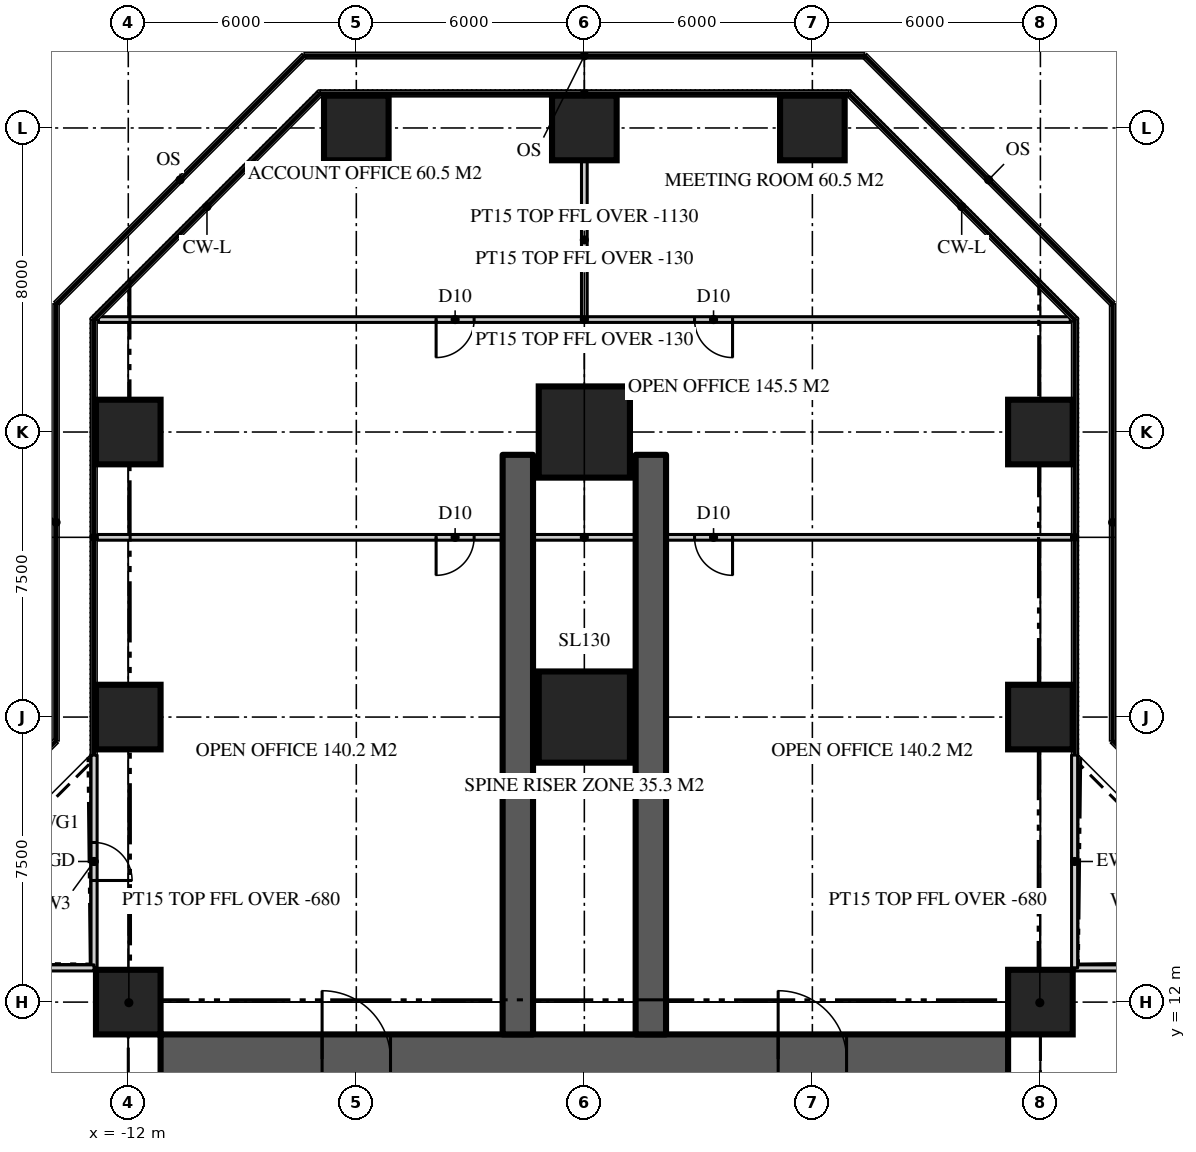
"""IFC4 building model, lengths in metres.
Left out: names, types, materials, properties, quantities, classifications, styles, units other than length and angle.
Written with IfcOpenShell. Run it as: python <this file> out.ifc"""

import sys

from ifc_helpers import new_model, si_unit, direction, frame, frame_2d, origin, origin_2d, place, context, subcontext, project, spatial, rectangle, extrude, element, fill, save


model = new_model("IFC4")
c1 = context("Model", 3, precision=1e-05, world=origin(), true_north=direction((0.0, 1.0)))
c2 = subcontext(c1, "Body", "Model", "MODEL_VIEW")
j1 = project(units=[si_unit("LENGTHUNIT", "METRE"), si_unit("PLANEANGLEUNIT", "RADIAN")], contexts=[c1])
p1 = place(None, origin())
s1 = spatial("IfcSite", under=j1, at=p1, CompositionType="ELEMENT")
p2 = place(p1, origin())
s2 = spatial("IfcBuilding", under=s1, at=p2, CompositionType="ELEMENT")
p3 = place(p2, frame((0.0, 0.0, 90.3)))
s3 = spatial("IfcBuildingStorey", under=s2, at=p3, CompositionType="ELEMENT", Elevation=90.3)
p4 = place(p3, frame((-11.15, 10.5, 0.0), z_axis=(0.0, 0.0, 1.0), x_axis=(1.0, 0.0, 0.0)))
e1 = element("IfcWall", 1, at=p4, inside=s3, PredefinedType="SHEAR", context=c2, shape_type="SweptSolid", body=[
    extrude(rectangle(XDim=22.3, YDim=1.3, at=frame_2d((11.15, 0.0))), origin(), (0.0, 0.0, 1.0), 3.9),
])
p5 = place(p4, frame((4.25, 0.0, 0.0)))
e2 = element("IfcOpeningElement", 2, at=p5, cuts=e1, PredefinedType="OPENING", context=c2, shape_type="SweptSolid", body=[
    extrude(rectangle(XDim=1.8, YDim=2.2, at=frame_2d((0.9, 1.1))), frame((0.0, 0.66, 0.0), z_axis=(0.0, -1.0, 0.0), x_axis=(1.0, 0.0, 0.0)), (0.0, 0.0, 1.0), 1.32),
])
p6 = place(p4, frame((16.25, 0.0, 0.0)))
e3 = element("IfcOpeningElement", 3, at=p6, cuts=e1, PredefinedType="OPENING", context=c2, shape_type="SweptSolid", body=[
    extrude(rectangle(XDim=1.8, YDim=2.2, at=frame_2d((0.9, 1.1))), frame((0.0, 0.66, 0.0), z_axis=(0.0, -1.0, 0.0), x_axis=(1.0, 0.0, 0.0)), (0.0, 0.0, 1.0), 1.32),
])
for number, where, z_axis, x_axis in (
    (4, (1.75, 11.15, 0.0), (0.0, 0.0, 1.0), (0.0, 1.0, 0.0)),
    (5, (-1.75, 11.15, 0.0), (0.0, 0.0, 1.0), (0.0, 1.0, 0.0)),
):
    element("IfcWall", number, at=place(p3, frame(where, z_axis=z_axis, x_axis=x_axis)), inside=s3, PredefinedType="SHEAR", context=c2, shape_type="SweptSolid", body=[
        extrude(rectangle(XDim=15.25, YDim=0.8, at=frame_2d((7.625, 0.0))), origin(), (0.0, 0.0, 1.0), 3.9),
    ])
for number, where, z_axis, x_axis in (
    (6, (-12.0, 12.0, 0.0), (0.0, 0.0, 1.0), (1.0, 0.0, 0.0)),
    (7, (12.0, 12.0, 0.0), (0.0, 0.0, 1.0), (1.0, 0.0, 0.0)),
    (8, (-12.0, 19.5, 0.0), (0.0, 0.0, 1.0), (1.0, 0.0, 0.0)),
):
    element("IfcColumn", number, at=place(p3, frame(where, z_axis=z_axis, x_axis=x_axis)), inside=s3, PredefinedType="COLUMN", context=c2, shape_type="SweptSolid", body=[
        extrude(rectangle(XDim=1.7, YDim=1.7, at=origin_2d()), origin(), (0.0, 0.0, 1.0), 3.9),
    ])
p7 = place(p3, frame((0.0, 19.5, 0.0), z_axis=(0.0, 0.0, 1.0), x_axis=(1.0, 0.0, 0.0)))
e9 = element("IfcColumn", 9, at=p7, inside=s3, PredefinedType="COLUMN", context=c2, shape_type="SweptSolid", body=[
    extrude(rectangle(XDim=2.4, YDim=2.4, at=origin_2d()), origin(), (0.0, 0.0, 1.0), 3.9),
])
for number, where, z_axis, x_axis in (
    (10, (12.0, 19.5, 0.0), (0.0, 0.0, 1.0), (1.0, 0.0, 0.0)),
    (11, (-12.0, 27.0, 0.0), (0.0, 0.0, 1.0), (1.0, 0.0, 0.0)),
):
    element("IfcColumn", number, at=place(p3, frame(where, z_axis=z_axis, x_axis=x_axis)), inside=s3, PredefinedType="COLUMN", context=c2, shape_type="SweptSolid", body=[
        extrude(rectangle(XDim=1.7, YDim=1.7, at=origin_2d()), origin(), (0.0, 0.0, 1.0), 3.9),
    ])
p8 = place(p3, frame((0.0, 27.0, 0.0), z_axis=(0.0, 0.0, 1.0), x_axis=(1.0, 0.0, 0.0)))
e12 = element("IfcColumn", 12, at=p8, inside=s3, PredefinedType="COLUMN", context=c2, shape_type="SweptSolid", body=[
    extrude(rectangle(XDim=2.4, YDim=2.4, at=origin_2d()), origin(), (0.0, 0.0, 1.0), 3.9),
])
for number, where, z_axis, x_axis in (
    (13, (12.0, 27.0, 0.0), (0.0, 0.0, 1.0), (1.0, 0.0, 0.0)),
    (14, (-6.0, 35.0, 0.0), (0.0, 0.0, 1.0), (1.0, 0.0, 0.0)),
    (15, (0.0, 35.0, 0.0), (0.0, 0.0, 1.0), (1.0, 0.0, 0.0)),
    (16, (6.0, 35.0, 0.0), (0.0, 0.0, 1.0), (1.0, 0.0, 0.0)),
):
    element("IfcColumn", number, at=place(p3, frame(where, z_axis=z_axis, x_axis=x_axis)), inside=s3, PredefinedType="COLUMN", context=c2, shape_type="SweptSolid", body=[
        extrude(rectangle(XDim=1.7, YDim=1.7, at=origin_2d()), origin(), (0.0, 0.0, 1.0), 3.9),
    ])
p9 = place(p3, frame((18.5, 12.9, 0.0), z_axis=(0.0, 0.0, 1.0), x_axis=(-1.0, 0.0, 0.0)))
e17 = element("IfcWall", 17, at=p9, inside=s3, PredefinedType="SOLIDWALL", context=c2, shape_type="SweptSolid", body=[
    extrude(rectangle(XDim=5.6, YDim=0.16, at=frame_2d((2.8, 0.0))), origin(), (0.0, 0.0, 1.0), 3.77),
])
p10 = place(p9, frame((2.3, 0.0, 0.0)))
e18 = element("IfcOpeningElement", 18, at=p10, cuts=e17, PredefinedType="OPENING", context=c2, shape_type="SweptSolid", body=[
    extrude(rectangle(XDim=1.0, YDim=2.2, at=frame_2d((0.5, 1.1))), frame((0.0, 0.09, 0.0), z_axis=(0.0, -1.0, 0.0), x_axis=(1.0, 0.0, 0.0)), (0.0, 0.0, 1.0), 0.18),
])
p11 = place(p3, frame((12.9, 12.9, 0.0), z_axis=(0.0, 0.0, 1.0), x_axis=(0.0, 1.0, 0.0)))
e19 = element("IfcWall", 19, at=p11, inside=s3, PredefinedType="SOLIDWALL", context=c2, shape_type="SweptSolid", body=[
    extrude(rectangle(XDim=5.6, YDim=0.16, at=frame_2d((2.8, 0.0))), origin(), (0.0, 0.0, 1.0), 3.77),
])
p12 = place(p3, frame((-12.9, 18.5, 0.0), z_axis=(0.0, 0.0, 1.0), x_axis=(0.0, -1.0, 0.0)))
e20 = element("IfcWall", 20, at=p12, inside=s3, PredefinedType="SOLIDWALL", context=c2, shape_type="SweptSolid", body=[
    extrude(rectangle(XDim=5.6, YDim=0.16, at=frame_2d((2.8, 0.0))), origin(), (0.0, 0.0, 1.0), 3.77),
])
p13 = place(p12, frame((2.3, 0.0, 0.0)))
e21 = element("IfcOpeningElement", 21, at=p13, cuts=e20, PredefinedType="OPENING", context=c2, shape_type="SweptSolid", body=[
    extrude(rectangle(XDim=1.0, YDim=2.2, at=frame_2d((0.5, 1.1))), frame((0.0, 0.09, 0.0), z_axis=(0.0, -1.0, 0.0), x_axis=(1.0, 0.0, 0.0)), (0.0, 0.0, 1.0), 0.18),
])
p14 = place(p3, frame((-12.9, 12.9, 0.0), z_axis=(0.0, 0.0, 1.0), x_axis=(-1.0, 0.0, 0.0)))
e22 = element("IfcWall", 22, at=p14, inside=s3, PredefinedType="SOLIDWALL", context=c2, shape_type="SweptSolid", body=[
    extrude(rectangle(XDim=5.6, YDim=0.16, at=frame_2d((2.8, 0.0))), origin(), (0.0, 0.0, 1.0), 3.77),
])
p15 = place(p3, frame((12.82, 24.229, 0.0), z_axis=(0.0, 0.0, 1.0), x_axis=(-1.0, 0.0, 0.0)))
e23 = element("IfcWall", 23, at=p15, inside=s3, PredefinedType="PARTITIONING", context=c2, shape_type="SweptSolid", body=[
    extrude(rectangle(XDim=25.64, YDim=0.15, at=frame_2d((12.82, 0.0))), origin(), (0.0, 0.0, 1.0), 3.77),
])
p16 = place(p15, frame((15.72, 0.0, 0.0)))
e24 = element("IfcOpeningElement", 24, at=p16, cuts=e23, PredefinedType="OPENING", context=c2, shape_type="SweptSolid", body=[
    extrude(rectangle(XDim=1.0, YDim=2.2, at=frame_2d((0.5, 1.1))), frame((0.0, 0.085, 0.0), z_axis=(0.0, -1.0, 0.0), x_axis=(1.0, 0.0, 0.0)), (0.0, 0.0, 1.0), 0.17),
])
p17 = place(p15, frame((8.92, 0.0, 0.0)))
e25 = element("IfcOpeningElement", 25, at=p17, cuts=e23, PredefinedType="OPENING", context=c2, shape_type="SweptSolid", body=[
    extrude(rectangle(XDim=1.0, YDim=2.2, at=frame_2d((0.5, 1.1))), frame((0.0, 0.085, 0.0), z_axis=(0.0, -1.0, 0.0), x_axis=(1.0, 0.0, 0.0)), (0.0, 0.0, 1.0), 0.17),
])
p18 = place(p3, frame((12.786, 29.959, 0.0), z_axis=(0.0, 0.0, 1.0), x_axis=(-1.0, 0.0, 0.0)))
e26 = element("IfcWall", 26, at=p18, inside=s3, PredefinedType="PARTITIONING", context=c2, shape_type="SweptSolid", body=[
    extrude(rectangle(XDim=25.573, YDim=0.15, at=frame_2d((12.786, 0.0))), origin(), (0.0, 0.0, 1.0), 3.77),
])
p19 = place(p18, frame((15.687, 0.0, 0.0)))
e27 = element("IfcOpeningElement", 27, at=p19, cuts=e26, PredefinedType="OPENING", context=c2, shape_type="SweptSolid", body=[
    extrude(rectangle(XDim=1.0, YDim=2.2, at=frame_2d((0.5, 1.1))), frame((0.0, 0.085, 0.0), z_axis=(0.0, -1.0, 0.0), x_axis=(1.0, 0.0, 0.0)), (0.0, 0.0, 1.0), 0.17),
])
p20 = place(p18, frame((8.886, 0.0, 0.0)))
e28 = element("IfcOpeningElement", 28, at=p20, cuts=e26, PredefinedType="OPENING", context=c2, shape_type="SweptSolid", body=[
    extrude(rectangle(XDim=1.0, YDim=2.2, at=frame_2d((0.5, 1.1))), frame((0.0, 0.085, 0.0), z_axis=(0.0, -1.0, 0.0), x_axis=(1.0, 0.0, 0.0)), (0.0, 0.0, 1.0), 0.17),
])
p21 = place(p3, frame((0.0, 29.959, 0.0), z_axis=(0.0, 0.0, 1.0), x_axis=(0.0, 1.0, 0.0)))
e29 = element("IfcWall", 29, at=p21, inside=s3, PredefinedType="PARTITIONING", context=c2, shape_type="SweptSolid", body=[
    extrude(rectangle(XDim=4.191, YDim=0.15, at=frame_2d((2.095, 0.0))), origin(), (0.0, 0.0, 1.0), 2.77),
])
for number, where, z_axis, x_axis in (
    (30, (11.15, 11.15, 0.0), (0.0, 0.0, 1.0), (0.707, 0.707, 0.0)),
    (31, (-11.15, 11.15, 0.0), (0.0, 0.0, 1.0), (-0.707, 0.707, 0.0)),
):
    element("IfcWall", number, at=place(p3, frame(where, z_axis=z_axis, x_axis=x_axis)), inside=s3, PredefinedType="PARTITIONING", context=c2, shape_type="SweptSolid", body=[
        extrude(rectangle(XDim=2.362, YDim=0.15, at=frame_2d((1.181, 0.0))), origin(), (0.0, 0.0, 1.0), 3.22),
    ])
p22 = place(p13, origin())
e32 = element("IfcDoor", 32, at=p22, inside=s3, OperationType="SINGLE_SWING_RIGHT", PredefinedType="DOOR", context=c2, shape_type="SweptSolid", body=[
    extrude(rectangle(XDim=1.0, YDim=2.2, at=frame_2d((0.5, 1.1))), frame((0.0, 0.025, 0.0), z_axis=(0.0, -1.0, 0.0), x_axis=(1.0, 0.0, 0.0)), (0.0, 0.0, 1.0), 0.05),
])
fill(e21, e32)
p23 = place(p5, origin())
e33 = element("IfcDoor", 33, at=p23, inside=s3, OperationType="DOUBLE_DOOR_DOUBLE_SWING", PredefinedType="DOOR", context=c2, shape_type="SweptSolid", body=[
    extrude(rectangle(XDim=1.8, YDim=2.2, at=frame_2d((0.9, 1.1))), frame((0.0, 0.025, 0.0), z_axis=(0.0, -1.0, 0.0), x_axis=(1.0, 0.0, 0.0)), (0.0, 0.0, 1.0), 0.05),
])
fill(e2, e33)
p24 = place(p6, origin())
e34 = element("IfcDoor", 34, at=p24, inside=s3, OperationType="DOUBLE_DOOR_DOUBLE_SWING", PredefinedType="DOOR", context=c2, shape_type="SweptSolid", body=[
    extrude(rectangle(XDim=1.8, YDim=2.2, at=frame_2d((0.9, 1.1))), frame((0.0, 0.025, 0.0), z_axis=(0.0, -1.0, 0.0), x_axis=(1.0, 0.0, 0.0)), (0.0, 0.0, 1.0), 0.05),
])
fill(e3, e34)
p25 = place(p16, origin())
e35 = element("IfcDoor", 35, at=p25, inside=s3, OperationType="SINGLE_SWING_RIGHT", PredefinedType="DOOR", context=c2, shape_type="SweptSolid", body=[
    extrude(rectangle(XDim=1.0, YDim=2.2, at=frame_2d((0.5, 1.1))), frame((0.0, 0.025, 0.0), z_axis=(0.0, -1.0, 0.0), x_axis=(1.0, 0.0, 0.0)), (0.0, 0.0, 1.0), 0.05),
])
fill(e24, e35)
p26 = place(p17, origin())
e36 = element("IfcDoor", 36, at=p26, inside=s3, OperationType="SINGLE_SWING_LEFT", PredefinedType="DOOR", context=c2, shape_type="SweptSolid", body=[
    extrude(rectangle(XDim=1.0, YDim=2.2, at=frame_2d((0.5, 1.1))), frame((0.0, 0.025, 0.0), z_axis=(0.0, -1.0, 0.0), x_axis=(1.0, 0.0, 0.0)), (0.0, 0.0, 1.0), 0.05),
])
fill(e25, e36)
p27 = place(p19, origin())
e37 = element("IfcDoor", 37, at=p27, inside=s3, OperationType="SINGLE_SWING_RIGHT", PredefinedType="DOOR", context=c2, shape_type="SweptSolid", body=[
    extrude(rectangle(XDim=1.0, YDim=2.2, at=frame_2d((0.5, 1.1))), frame((0.0, 0.025, 0.0), z_axis=(0.0, -1.0, 0.0), x_axis=(1.0, 0.0, 0.0)), (0.0, 0.0, 1.0), 0.05),
])
fill(e27, e37)
p28 = place(p20, origin())
e38 = element("IfcDoor", 38, at=p28, inside=s3, OperationType="SINGLE_SWING_LEFT", PredefinedType="DOOR", context=c2, shape_type="SweptSolid", body=[
    extrude(rectangle(XDim=1.0, YDim=2.2, at=frame_2d((0.5, 1.1))), frame((0.0, 0.025, 0.0), z_axis=(0.0, -1.0, 0.0), x_axis=(1.0, 0.0, 0.0)), (0.0, 0.0, 1.0), 0.05),
])
fill(e28, e38)
save(model, sys.argv[1])
